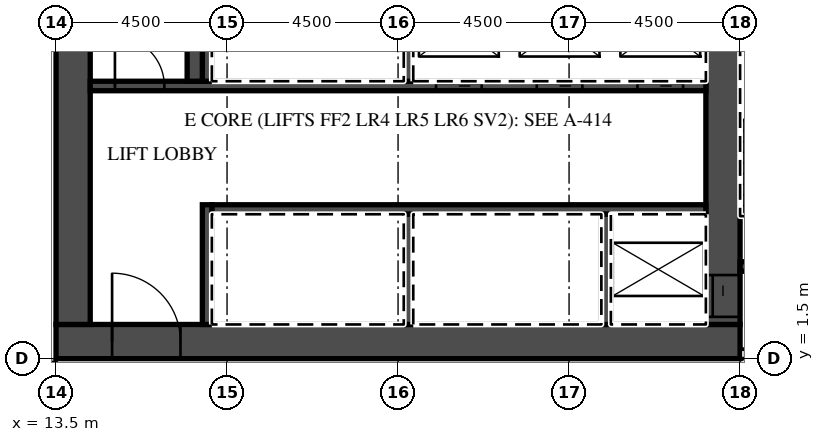
"""IFC4 building model, lengths in metres.
Left out: names, types, materials, properties, quantities, classifications, styles, units other than length and angle.
Written with IfcOpenShell. Run it as: python <this file> out.ifc"""

import sys

from ifc_helpers import new_model, si_unit, direction, frame, frame_2d, origin, place, context, subcontext, project, spatial, rectangle, extrude, element, fill, save


model = new_model("IFC4")
c1 = context("Model", 3, precision=1e-05, world=origin(), true_north=direction((0.0, 1.0)))
c2 = subcontext(c1, "Body", "Model", "MODEL_VIEW")
j1 = project(units=[si_unit("LENGTHUNIT", "METRE"), si_unit("PLANEANGLEUNIT", "RADIAN")], contexts=[c1])
p1 = place(None, origin())
s1 = spatial("IfcSite", under=j1, at=p1, CompositionType="ELEMENT")
p2 = place(p1, origin())
s2 = spatial("IfcBuilding", under=s1, at=p2, CompositionType="ELEMENT")
p3 = place(p2, frame((0.0, 0.0, 96.3)))
s3 = spatial("IfcBuildingStorey", under=s2, at=p3, CompositionType="ELEMENT", Elevation=96.3)
p4 = place(p3, frame((-44.55, 1.3, 0.0), z_axis=(0.0, 0.0, 1.0), x_axis=(1.0, 0.0, 0.0)))
e1 = element("IfcWall", 1, at=p4, inside=s3, PredefinedType="PARTITIONING", context=c2, shape_type="SweptSolid", body=[
    extrude(rectangle(XDim=58.05, YDim=0.2, at=frame_2d((29.025, 0.0))), origin(), (0.0, 0.0, 1.0), 3.0),
])
p5 = place(p4, frame((0.525, 0.0, 0.0)))
e2 = element("IfcOpeningElement", 2, at=p5, cuts=e1, PredefinedType="OPENING", context=c2, shape_type="SweptSolid", body=[
    extrude(rectangle(XDim=1.0, YDim=2.1, at=frame_2d((0.5, 1.05))), frame((0.0, 0.11, 0.0), z_axis=(0.0, -1.0, 0.0), x_axis=(1.0, 0.0, 0.0)), (0.0, 0.0, 1.0), 0.22),
])
p6 = place(p4, frame((4.625, 0.0, 0.0)))
e3 = element("IfcOpeningElement", 3, at=p6, cuts=e1, PredefinedType="OPENING", context=c2, shape_type="SweptSolid", body=[
    extrude(rectangle(XDim=1.0, YDim=2.1, at=frame_2d((0.5, 1.05))), frame((0.0, 0.11, 0.0), z_axis=(0.0, -1.0, 0.0), x_axis=(1.0, 0.0, 0.0)), (0.0, 0.0, 1.0), 0.22),
])
p7 = place(p4, frame((10.987, 0.0, 0.0)))
e4 = element("IfcOpeningElement", 4, at=p7, cuts=e1, PredefinedType="OPENING", context=c2, shape_type="SweptSolid", body=[
    extrude(rectangle(XDim=1.2, YDim=2.1, at=frame_2d((0.6, 1.05))), frame((0.0, 0.11, 0.0), z_axis=(0.0, -1.0, 0.0), x_axis=(1.0, 0.0, 0.0)), (0.0, 0.0, 1.0), 0.22),
])
p8 = place(p4, frame((22.912, 0.0, 0.0)))
e5 = element("IfcOpeningElement", 5, at=p8, cuts=e1, PredefinedType="OPENING", context=c2, shape_type="SweptSolid", body=[
    extrude(rectangle(XDim=1.2, YDim=2.1, at=frame_2d((0.6, 1.05))), frame((0.0, 0.11, 0.0), z_axis=(0.0, -1.0, 0.0), x_axis=(1.0, 0.0, 0.0)), (0.0, 0.0, 1.0), 0.22),
])
p9 = place(p4, frame((28.987, 0.0, 0.0)))
e6 = element("IfcOpeningElement", 6, at=p9, cuts=e1, PredefinedType="OPENING", context=c2, shape_type="SweptSolid", body=[
    extrude(rectangle(XDim=1.2, YDim=2.1, at=frame_2d((0.6, 1.05))), frame((0.0, 0.11, 0.0), z_axis=(0.0, -1.0, 0.0), x_axis=(1.0, 0.0, 0.0)), (0.0, 0.0, 1.0), 0.22),
])
p10 = place(p4, frame((36.125, 0.0, 0.0)))
e7 = element("IfcOpeningElement", 7, at=p10, cuts=e1, PredefinedType="OPENING", context=c2, shape_type="SweptSolid", body=[
    extrude(rectangle(XDim=1.0, YDim=2.1, at=frame_2d((0.5, 1.05))), frame((0.0, 0.11, 0.0), z_axis=(0.0, -1.0, 0.0), x_axis=(1.0, 0.0, 0.0)), (0.0, 0.0, 1.0), 0.22),
])
p11 = place(p4, frame((42.975, 0.0, 0.0)))
e8 = element("IfcOpeningElement", 8, at=p11, cuts=e1, PredefinedType="OPENING", context=c2, shape_type="SweptSolid", body=[
    extrude(rectangle(XDim=1.0, YDim=2.1, at=frame_2d((0.5, 1.05))), frame((0.0, 0.11, 0.0), z_axis=(0.0, -1.0, 0.0), x_axis=(1.0, 0.0, 0.0)), (0.0, 0.0, 1.0), 0.22),
])
p12 = place(p4, frame((47.5, 0.0, 0.0)))
e9 = element("IfcOpeningElement", 9, at=p12, cuts=e1, PredefinedType="OPENING", context=c2, shape_type="SweptSolid", body=[
    extrude(rectangle(XDim=1.0, YDim=2.1, at=frame_2d((0.5, 1.05))), frame((0.0, 0.11, 0.0), z_axis=(0.0, -1.0, 0.0), x_axis=(1.0, 0.0, 0.0)), (0.0, 0.0, 1.0), 0.22),
])
p13 = place(p4, frame((49.6, 0.0, 0.0)))
e10 = element("IfcOpeningElement", 10, at=p13, cuts=e1, PredefinedType="OPENING", context=c2, shape_type="SweptSolid", body=[
    extrude(rectangle(XDim=1.0, YDim=2.1, at=frame_2d((0.5, 1.05))), frame((0.0, 0.11, 0.0), z_axis=(0.0, -1.0, 0.0), x_axis=(1.0, 0.0, 0.0)), (0.0, 0.0, 1.0), 0.22),
])
p14 = place(p4, frame((56.475, 0.0, 0.0)))
e11 = element("IfcOpeningElement", 11, at=p14, cuts=e1, PredefinedType="OPENING", context=c2, shape_type="SweptSolid", body=[
    extrude(rectangle(XDim=1.0, YDim=2.1, at=frame_2d((0.5, 1.05))), frame((0.0, 0.11, 0.0), z_axis=(0.0, -1.0, 0.0), x_axis=(1.0, 0.0, 0.0)), (0.0, 0.0, 1.0), 0.22),
])
p15 = place(p3, frame((13.5, 1.95, 0.0), z_axis=(0.0, 0.0, 1.0), x_axis=(1.0, 0.0, 0.0)))
e12 = element("IfcWall", 12, at=p15, inside=s3, PredefinedType="SHEAR", context=c2, shape_type="SweptSolid", body=[
    extrude(rectangle(XDim=18.0, YDim=0.9, at=frame_2d((9.0, 0.0))), origin(), (0.0, 0.0, 1.0), 3.0),
])
p16 = place(p15, frame((1.475, 0.0, 0.0)))
e13 = element("IfcOpeningElement", 13, at=p16, cuts=e12, PredefinedType="OPENING", context=c2, shape_type="SweptSolid", body=[
    extrude(rectangle(XDim=1.8, YDim=2.1, at=frame_2d((0.9, 1.05))), frame((0.0, 0.46, 0.0), z_axis=(0.0, -1.0, 0.0), x_axis=(1.0, 0.0, 0.0)), (0.0, 0.0, 1.0), 0.92),
])
p17 = place(p3, frame((31.05, 2.4, 0.0), z_axis=(0.0, 0.0, 1.0), x_axis=(0.0, 1.0, 0.0)))
e14 = element("IfcWall", 14, at=p17, inside=s3, PredefinedType="SHEAR", context=c2, shape_type="SweptSolid", body=[
    extrude(rectangle(XDim=12.8, YDim=0.9, at=frame_2d((6.4, 0.0))), origin(), (0.0, 0.0, 1.0), 3.0),
])
p18 = place(p17, frame((0.2, 0.0, 0.0)))
e15 = element("IfcOpeningElement", 15, at=p18, cuts=e14, PredefinedType="OPENING", context=c2, shape_type="SweptSolid", body=[
    extrude(rectangle(XDim=1.1, YDim=2.1, at=frame_2d((0.55, 1.05))), frame((0.0, 0.46, 0.0), z_axis=(0.0, -1.0, 0.0), x_axis=(1.0, 0.0, 0.0)), (0.0, 0.0, 1.0), 0.92),
])
p19 = place(p3, frame((13.95, 2.4, 0.0), z_axis=(0.0, 0.0, 1.0), x_axis=(0.0, 1.0, 0.0)))
e16 = element("IfcWall", 16, at=p19, inside=s3, PredefinedType="SHEAR", context=c2, shape_type="SweptSolid", body=[
    extrude(rectangle(XDim=12.2, YDim=0.9, at=frame_2d((6.1, 0.0))), origin(), (0.0, 0.0, 1.0), 3.0),
])
p20 = place(p3, frame((17.6, 5.425, 0.0), z_axis=(0.0, 0.0, 1.0), x_axis=(1.0, 0.0, 0.0)))
e17 = element("IfcWall", 17, at=p20, inside=s3, PredefinedType="SHEAR", context=c2, shape_type="SweptSolid", body=[
    extrude(rectangle(XDim=13.0, YDim=0.25, at=frame_2d((6.5, 0.0))), origin(), (0.0, 0.0, 1.0), 3.0),
])
p21 = place(p3, frame((17.475, 2.4, 0.0), z_axis=(0.0, 0.0, 1.0), x_axis=(0.0, 1.0, 0.0)))
e18 = element("IfcWall", 18, at=p21, inside=s3, PredefinedType="SHEAR", context=c2, shape_type="SweptSolid", body=[
    extrude(rectangle(XDim=3.15, YDim=0.25, at=frame_2d((1.575, 0.0))), origin(), (0.0, 0.0, 1.0), 3.0),
])
for number, where, z_axis, x_axis in (
    (19, (27.975, 2.4, 0.0), (0.0, 0.0, 1.0), (0.0, 1.0, 0.0)),
    (20, (22.775, 2.4, 0.0), (0.0, 0.0, 1.0), (0.0, 1.0, 0.0)),
):
    element("IfcWall", number, at=place(p3, frame(where, z_axis=z_axis, x_axis=x_axis)), inside=s3, PredefinedType="SHEAR", context=c2, shape_type="SweptSolid", body=[
        extrude(rectangle(XDim=2.9, YDim=0.25, at=frame_2d((1.45, 0.0))), origin(), (0.0, 0.0, 1.0), 3.0),
    ])
p22 = place(p3, frame((14.4, 8.675, 0.0), z_axis=(0.0, 0.0, 1.0), x_axis=(1.0, 0.0, 0.0)))
e21 = element("IfcWall", 21, at=p22, inside=s3, PredefinedType="SHEAR", context=c2, shape_type="SweptSolid", body=[
    extrude(rectangle(XDim=16.2, YDim=0.25, at=frame_2d((8.1, 0.0))), origin(), (0.0, 0.0, 1.0), 3.0),
])
p23 = place(p22, frame((14.4, 0.0, 0.0)))
e22 = element("IfcOpeningElement", 22, at=p23, cuts=e21, PredefinedType="OPENING", context=c2, shape_type="SweptSolid", body=[
    extrude(rectangle(XDim=1.2, YDim=2.1, at=frame_2d((0.6, 1.05))), frame((0.0, 0.135, 0.0), z_axis=(0.0, -1.0, 0.0), x_axis=(1.0, 0.0, 0.0)), (0.0, 0.0, 1.0), 0.27),
])
p24 = place(p22, frame((11.75, 0.0, 0.0)))
e23 = element("IfcOpeningElement", 23, at=p24, cuts=e21, PredefinedType="OPENING", context=c2, shape_type="SweptSolid", body=[
    extrude(rectangle(XDim=1.2, YDim=2.1, at=frame_2d((0.6, 1.05))), frame((0.0, 0.135, 0.0), z_axis=(0.0, -1.0, 0.0), x_axis=(1.0, 0.0, 0.0)), (0.0, 0.0, 1.0), 0.27),
])
p25 = place(p22, frame((9.1, 0.0, 0.0)))
e24 = element("IfcOpeningElement", 24, at=p25, cuts=e21, PredefinedType="OPENING", context=c2, shape_type="SweptSolid", body=[
    extrude(rectangle(XDim=1.2, YDim=2.1, at=frame_2d((0.6, 1.05))), frame((0.0, 0.135, 0.0), z_axis=(0.0, -1.0, 0.0), x_axis=(1.0, 0.0, 0.0)), (0.0, 0.0, 1.0), 0.27),
])
p26 = place(p22, frame((0.65, 0.0, 0.0)))
e25 = element("IfcOpeningElement", 25, at=p26, cuts=e21, PredefinedType="OPENING", context=c2, shape_type="SweptSolid", body=[
    extrude(rectangle(XDim=1.3, YDim=2.1, at=frame_2d((0.65, 1.05))), frame((0.0, 0.135, 0.0), z_axis=(0.0, -1.0, 0.0), x_axis=(1.0, 0.0, 0.0)), (0.0, 0.0, 1.0), 0.27),
])
for number, where, z_axis, x_axis in (
    (26, (17.475, 8.8, 0.0), (0.0, 0.0, 1.0), (0.0, 1.0, 0.0)),
    (27, (22.775, 8.8, 0.0), (0.0, 0.0, 1.0), (0.0, 1.0, 0.0)),
):
    element("IfcWall", number, at=place(p3, frame(where, z_axis=z_axis, x_axis=x_axis)), inside=s3, PredefinedType="SHEAR", context=c2, shape_type="SweptSolid", body=[
        extrude(rectangle(XDim=2.9, YDim=0.25, at=frame_2d((1.45, 0.0))), origin(), (0.0, 0.0, 1.0), 3.0),
    ])
p27 = place(p3, frame((17.15, 8.8, 0.0), z_axis=(0.0, 0.0, 1.0), x_axis=(0.0, 1.0, 0.0)))
e28 = element("IfcWall", 28, at=p27, inside=s3, PredefinedType="SHEAR", context=c2, shape_type="SweptSolid", body=[
    extrude(rectangle(XDim=5.8, YDim=0.4, at=frame_2d((2.9, 0.0))), origin(), (0.0, 0.0, 1.0), 3.0),
])
p28 = place(p3, frame((31.5, 1.625, 0.0), z_axis=(0.0, 0.0, 1.0), x_axis=(1.0, 0.0, 0.0)))
e29 = element("IfcWall", 29, at=p28, inside=s3, PredefinedType="PARTITIONING", context=c2, shape_type="SweptSolid", body=[
    extrude(rectangle(XDim=13.05, YDim=0.25, at=frame_2d((6.525, 0.0))), origin(), (0.0, 0.0, 1.0), 3.0),
])
p29 = place(p28, frame((0.625, 0.0, 0.0)))
e30 = element("IfcOpeningElement", 30, at=p29, cuts=e29, PredefinedType="OPENING", context=c2, shape_type="SweptSolid", body=[
    extrude(rectangle(XDim=1.3, YDim=2.1, at=frame_2d((0.65, 1.05))), frame((0.0, 0.135, 0.0), z_axis=(0.0, -1.0, 0.0), x_axis=(1.0, 0.0, 0.0)), (0.0, 0.0, 1.0), 0.27),
])
p30 = place(p28, frame((3.25, 0.0, 0.0)))
e31 = element("IfcOpeningElement", 31, at=p30, cuts=e29, PredefinedType="OPENING", context=c2, shape_type="SweptSolid", body=[
    extrude(rectangle(XDim=1.1, YDim=2.1, at=frame_2d((0.55, 1.05))), frame((0.0, 0.135, 0.0), z_axis=(0.0, -1.0, 0.0), x_axis=(1.0, 0.0, 0.0)), (0.0, 0.0, 1.0), 0.27),
])
p31 = place(p3, frame((31.5, 3.925, 0.0), z_axis=(0.0, 0.0, 1.0), x_axis=(1.0, 0.0, 0.0)))
e32 = element("IfcWall", 32, at=p31, inside=s3, PredefinedType="SHEAR", context=c2, shape_type="SweptSolid", body=[
    extrude(rectangle(XDim=2.55, YDim=0.25, at=frame_2d((1.275, 0.0))), origin(), (0.0, 0.0, 1.0), 3.0),
])
p32 = place(p31, frame((0.625, 0.0, 0.0)))
e33 = element("IfcOpeningElement", 33, at=p32, cuts=e32, PredefinedType="OPENING", context=c2, shape_type="SweptSolid", body=[
    extrude(rectangle(XDim=1.3, YDim=2.1, at=frame_2d((0.65, 1.05))), frame((0.0, 0.135, 0.0), z_axis=(0.0, -1.0, 0.0), x_axis=(1.0, 0.0, 0.0)), (0.0, 0.0, 1.0), 0.27),
])
p33 = place(p23, origin())
e34 = element("IfcDoor", 34, at=p33, inside=s3, OperationType="SLIDING_TO_LEFT", PredefinedType="DOOR", context=c2, shape_type="SweptSolid", body=[
    extrude(rectangle(XDim=1.2, YDim=2.1, at=frame_2d((0.6, 1.05))), frame((0.0, 0.025, 0.0), z_axis=(0.0, -1.0, 0.0), x_axis=(1.0, 0.0, 0.0)), (0.0, 0.0, 1.0), 0.05),
])
fill(e22, e34)
p34 = place(p24, origin())
e35 = element("IfcDoor", 35, at=p34, inside=s3, OperationType="SLIDING_TO_RIGHT", PredefinedType="DOOR", context=c2, shape_type="SweptSolid", body=[
    extrude(rectangle(XDim=1.2, YDim=2.1, at=frame_2d((0.6, 1.05))), frame((0.0, 0.025, 0.0), z_axis=(0.0, -1.0, 0.0), x_axis=(1.0, 0.0, 0.0)), (0.0, 0.0, 1.0), 0.05),
])
fill(e23, e35)
p35 = place(p25, origin())
e36 = element("IfcDoor", 36, at=p35, inside=s3, OperationType="SLIDING_TO_RIGHT", PredefinedType="DOOR", context=c2, shape_type="SweptSolid", body=[
    extrude(rectangle(XDim=1.2, YDim=2.1, at=frame_2d((0.6, 1.05))), frame((0.0, 0.025, 0.0), z_axis=(0.0, -1.0, 0.0), x_axis=(1.0, 0.0, 0.0)), (0.0, 0.0, 1.0), 0.05),
])
fill(e24, e36)
p36 = place(p18, origin())
e37 = element("IfcDoor", 37, at=p36, inside=s3, OperationType="SLIDING_TO_LEFT", PredefinedType="DOOR", context=c2, shape_type="SweptSolid", body=[
    extrude(rectangle(XDim=1.1, YDim=2.1, at=frame_2d((0.55, 1.05))), frame((0.0, 0.025, 0.0), z_axis=(0.0, -1.0, 0.0), x_axis=(1.0, 0.0, 0.0)), (0.0, 0.0, 1.0), 0.05),
])
fill(e15, e37)
p37 = place(p16, origin())
e38 = element("IfcDoor", 38, at=p37, inside=s3, OperationType="DOUBLE_DOOR_DOUBLE_SWING", PredefinedType="DOOR", context=c2, shape_type="SweptSolid", body=[
    extrude(rectangle(XDim=1.8, YDim=2.1, at=frame_2d((0.9, 1.05))), frame((0.0, 0.025, 0.0), z_axis=(0.0, -1.0, 0.0), x_axis=(1.0, 0.0, 0.0)), (0.0, 0.0, 1.0), 0.05),
])
fill(e13, e38)
p38 = place(p26, origin())
e39 = element("IfcDoor", 39, at=p38, inside=s3, OperationType="SINGLE_SWING_LEFT", PredefinedType="DOOR", context=c2, shape_type="SweptSolid", body=[
    extrude(rectangle(XDim=1.3, YDim=2.1, at=frame_2d((0.65, 1.05))), frame((0.0, 0.025, 0.0), z_axis=(0.0, -1.0, 0.0), x_axis=(1.0, 0.0, 0.0)), (0.0, 0.0, 1.0), 0.05),
])
fill(e25, e39)
save(model, sys.argv[1])
